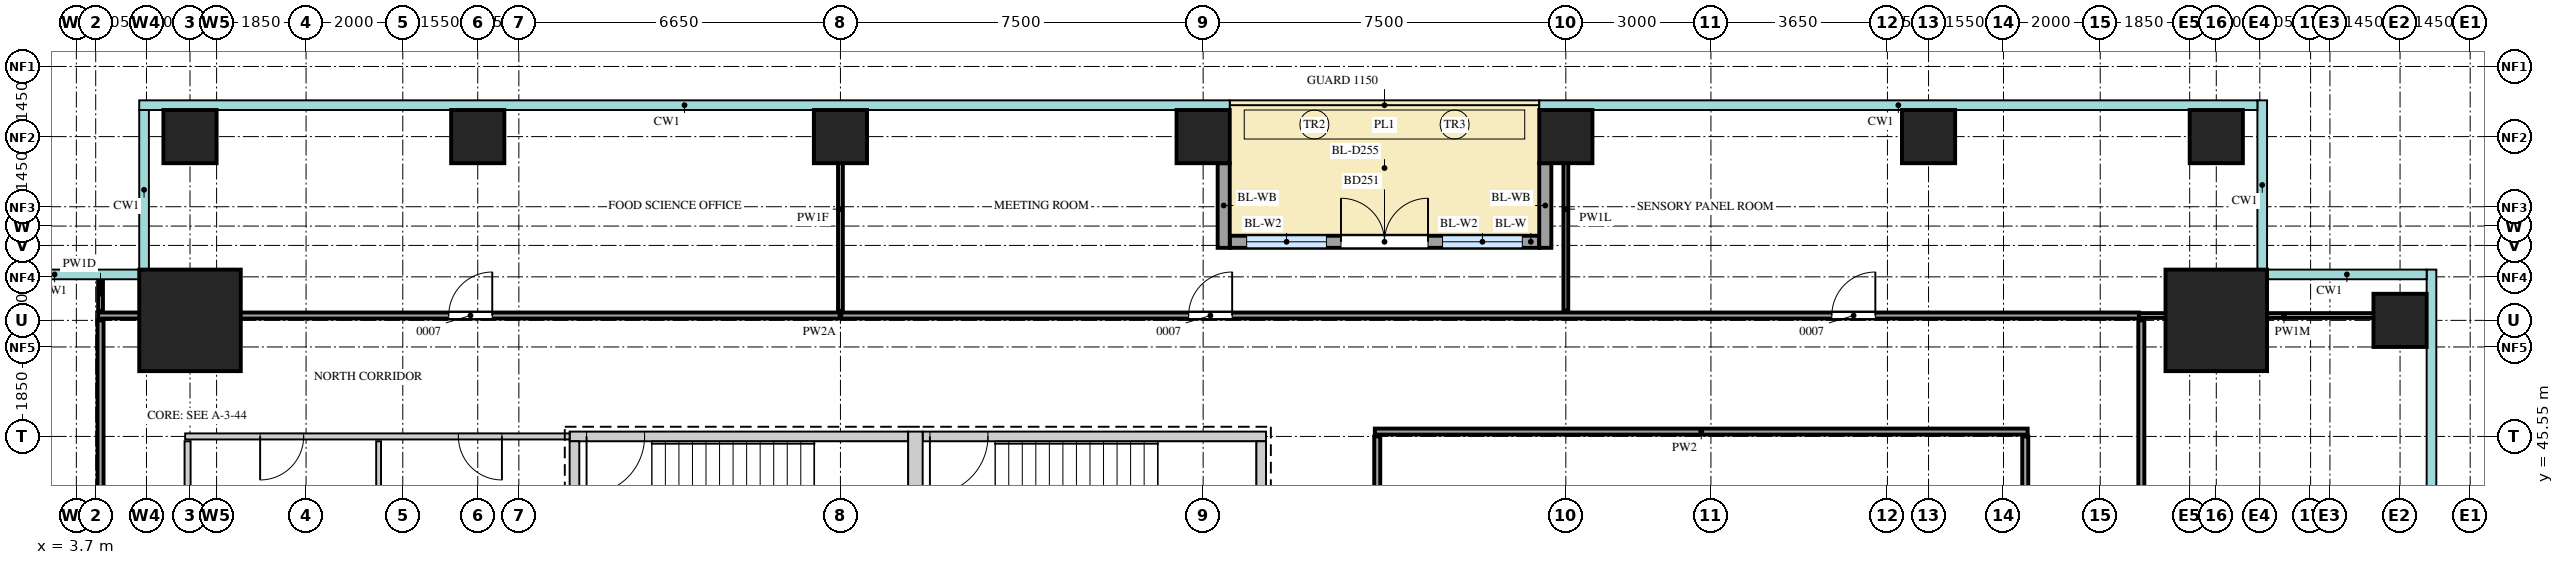
"""IFC4 building model, lengths in metres.
Left out: names, types, materials, properties, quantities, classifications, styles, units other than length and angle.
Written with IfcOpenShell. Run it as: python <this file> out.ifc"""

import sys

from ifc_helpers import new_model, si_unit, direction, frame, frame_2d, origin, origin_2d, place, context, subcontext, project, spatial, rectangle, extrude, source, transform, mapped, element, fill, save


model = new_model("IFC4")
c1 = context("Model", 3, precision=1e-05, world=origin(), true_north=direction((0.0, 1.0)))
c2 = subcontext(c1, "Body", "Model", "MODEL_VIEW")
j1 = project(units=[si_unit("LENGTHUNIT", "METRE"), si_unit("PLANEANGLEUNIT", "RADIAN")], contexts=[c1])
p1 = place(None, origin())
s1 = spatial("IfcSite", under=j1, at=p1, CompositionType="ELEMENT")
p2 = place(p1, origin())
s2 = spatial("IfcBuilding", under=s1, at=p2, CompositionType="ELEMENT")
p3 = place(p2, frame((0.0, 0.0, 119.1)))
s3 = spatial("IfcBuildingStorey", under=s2, at=p3, CompositionType="ELEMENT", Elevation=119.1)
m1 = source(origin(), c2, "Body", "SweptSolid", [
    extrude(rectangle(XDim=7.0, YDim=0.2, at=frame_2d((3.5, 0.0))), origin(), (0.0, 0.0, 1.0), 4.1),
])
p4 = place(p3, frame((13.9, 45.55, 0.0), z_axis=(0.0, 0.0, 1.0), x_axis=(1.0, 0.0, 0.0)))
e1 = element("IfcWall", 1, at=p4, inside=s3, PredefinedType="SHEAR", context=c2, shape_type="MappedRepresentation", body=[
    mapped(m1, transform((0.0, 0.0, 0.0))),
])
m2 = source(origin(), c2, "Body", "SweptSolid", [
    extrude(rectangle(XDim=1.2, YDim=2.1, at=frame_2d((0.6, 1.05))), frame((0.0, 0.11, 0.0), z_axis=(0.0, -1.0, 0.0), x_axis=(1.0, 0.0, 0.0)), (0.0, 0.0, 1.0), 0.22),
])
p5 = place(p4, frame((0.35, 0.0, 0.0)))
e2 = element("IfcOpeningElement", 2, at=p5, cuts=e1, PredefinedType="OPENING", context=c2, shape_type="MappedRepresentation", body=[
    mapped(m2, transform((0.0, 0.0, 0.0))),
])
m3 = source(origin(), c2, "Body", "SweptSolid", [
    extrude(rectangle(XDim=7.1, YDim=0.2, at=frame_2d((3.55, 0.0))), origin(), (0.0, 0.0, 1.0), 4.1),
])
p6 = place(p3, frame((21.2, 45.55, 0.0), z_axis=(0.0, 0.0, 1.0), x_axis=(1.0, 0.0, 0.0)))
e3 = element("IfcWall", 3, at=p6, inside=s3, PredefinedType="SHEAR", context=c2, shape_type="MappedRepresentation", body=[
    mapped(m3, transform((0.0, 0.0, 0.0))),
])
p7 = place(p6, frame((0.15, 0.0, 0.0)))
e4 = element("IfcOpeningElement", 4, at=p7, cuts=e3, PredefinedType="OPENING", context=c2, shape_type="MappedRepresentation", body=[
    mapped(m2, transform((0.0, 0.0, 0.0))),
])
m4 = source(origin(), c2, "Body", "SweptSolid", [
    extrude(rectangle(XDim=3.75, YDim=0.3, at=frame_2d((1.875, 0.0))), origin(), (0.0, 0.0, 1.0), 4.1),
])
p8 = place(p3, frame((21.05, 41.9, 0.0), z_axis=(0.0, 0.0, 1.0), x_axis=(0.0, 1.0, 0.0)))
e5 = element("IfcWall", 5, at=p8, inside=s3, PredefinedType="SHEAR", context=c2, shape_type="MappedRepresentation", body=[
    mapped(m4, transform((0.0, 0.0, 0.0))),
])
m5 = source(origin(), c2, "Body", "SweptSolid", [
    extrude(rectangle(XDim=3.35, YDim=0.2, at=frame_2d((1.675, 0.0))), origin(), (0.0, 0.0, 1.0), 4.1),
])
for number, where, z_axis, x_axis in (
    (6, (14.0, 42.1, 0.0), (0.0, 0.0, 1.0), (0.0, 1.0, 0.0)),
    (7, (28.2, 42.1, 0.0), (0.0, 0.0, 1.0), (0.0, 1.0, 0.0)),
):
    element("IfcWall", number, at=place(p3, frame(where, z_axis=z_axis, x_axis=x_axis)), inside=s3, PredefinedType="SHEAR", context=c2, shape_type="MappedRepresentation", body=[
        mapped(m5, transform((0.0, 0.0, 0.0))),
    ])
m6 = source(origin(), c2, "Body", "SweptSolid", [
    extrude(rectangle(XDim=2.1, YDim=2.1, at=origin_2d()), origin(), (0.0, 0.0, 1.0), 4.4),
])
for number, where, z_axis, x_axis in (
    (8, (47.95, 47.95, 0.0), (0.0, 0.0, 1.0), (1.0, 0.0, 0.0)),
    (9, (6.05, 47.95, 0.0), (0.0, 0.0, 1.0), (1.0, 0.0, 0.0)),
):
    element("IfcColumn", number, at=place(p3, frame(where, z_axis=z_axis, x_axis=x_axis)), inside=s3, PredefinedType="COLUMN", context=c2, shape_type="MappedRepresentation", body=[
        mapped(m6, transform((0.0, 0.0, 0.0))),
    ])
m7 = source(origin(), c2, "Body", "SweptSolid", [
    extrude(rectangle(XDim=1.1, YDim=1.1, at=origin_2d()), origin(), (0.0, 0.0, 1.0), 4.1),
])
for number, where, z_axis, x_axis in (
    (10, (51.75, 47.95, 0.0), (0.0, 0.0, 1.0), (1.0, 0.0, 0.0)),
    (11, (6.05, 51.75, 0.0), (0.0, 0.0, 1.0), (1.0, 0.0, 0.0)),
    (12, (12.0, 51.75, 0.0), (0.0, 0.0, 1.0), (1.0, 0.0, 0.0)),
    (13, (19.5, 51.75, 0.0), (0.0, 0.0, 1.0), (1.0, 0.0, 0.0)),
    (14, (27.0, 51.75, 0.0), (0.0, 0.0, 1.0), (1.0, 0.0, 0.0)),
    (15, (34.5, 51.75, 0.0), (0.0, 0.0, 1.0), (1.0, 0.0, 0.0)),
    (16, (42.0, 51.75, 0.0), (0.0, 0.0, 1.0), (1.0, 0.0, 0.0)),
    (17, (47.95, 51.75, 0.0), (0.0, 0.0, 1.0), (1.0, 0.0, 0.0)),
):
    element("IfcColumn", number, at=place(p3, frame(where, z_axis=z_axis, x_axis=x_axis)), inside=s3, PredefinedType="COLUMN", context=c2, shape_type="MappedRepresentation", body=[
        mapped(m7, transform((0.0, 0.0, 0.0))),
    ])
m8 = source(origin(), c2, "Body", "SweptSolid", [
    extrude(rectangle(XDim=6.4, YDim=0.25, at=frame_2d((3.2, 0.0))), origin(), (0.0, 0.0, 1.0), 4.1),
])
p9 = place(p3, frame((27.55, 49.575, 0.0), z_axis=(0.0, 0.0, 1.0), x_axis=(1.0, 0.0, 0.0)))
e18 = element("IfcWall", 18, at=p9, inside=s3, PredefinedType="SOLIDWALL", context=c2, shape_type="MappedRepresentation", body=[
    mapped(m8, transform((0.0, 0.0, 0.0))),
])
m9 = source(origin(), c2, "Body", "SweptSolid", [
    extrude(rectangle(XDim=1.65, YDim=2.4, at=frame_2d((0.825, 1.2))), frame((0.0, 0.135, 0.0), z_axis=(0.0, -1.0, 0.0), x_axis=(1.0, 0.0, 0.0)), (0.0, 0.0, 1.0), 0.27),
])
p10 = place(p9, frame((0.35, 0.0, 0.0)))
e19 = element("IfcOpeningElement", 19, at=p10, cuts=e18, PredefinedType="OPENING", context=c2, shape_type="MappedRepresentation", body=[
    mapped(m9, transform((0.0, 0.0, 0.0))),
])
p11 = place(p9, frame((4.4, 0.0, 0.0)))
e20 = element("IfcOpeningElement", 20, at=p11, cuts=e18, PredefinedType="OPENING", context=c2, shape_type="MappedRepresentation", body=[
    mapped(m9, transform((0.0, 0.0, 0.0))),
])
m10 = source(origin(), c2, "Body", "SweptSolid", [
    extrude(rectangle(XDim=1.8, YDim=2.4, at=frame_2d((0.9, 1.2))), frame((0.0, 0.135, 0.0), z_axis=(0.0, -1.0, 0.0), x_axis=(1.0, 0.0, 0.0)), (0.0, 0.0, 1.0), 0.27),
])
p12 = place(p9, frame((2.3, 0.0, 0.0)))
e21 = element("IfcOpeningElement", 21, at=p12, cuts=e18, PredefinedType="OPENING", context=c2, shape_type="MappedRepresentation", body=[
    mapped(m10, transform((0.0, 0.0, 0.0))),
])
m11 = source(origin(), c2, "Body", "SweptSolid", [
    extrude(rectangle(XDim=1.75, YDim=0.25, at=frame_2d((0.875, 0.0))), origin(), (0.0, 0.0, 1.0), 3.8),
])
for number, where, z_axis, x_axis in (
    (22, (27.425, 51.2, 0.0), (0.0, 0.0, 1.0), (0.0, -1.0, 0.0)),
    (23, (34.075, 51.2, 0.0), (0.0, 0.0, 1.0), (0.0, -1.0, 0.0)),
):
    element("IfcWall", number, at=place(p3, frame(where, z_axis=z_axis, x_axis=x_axis)), inside=s3, PredefinedType="SOLIDWALL", context=c2, shape_type="MappedRepresentation", body=[
        mapped(m11, transform((0.0, 0.0, 0.0))),
    ])
m12 = source(origin(), c2, "Body", "SweptSolid", [
    extrude(rectangle(XDim=37.65, YDim=0.125, at=frame_2d((18.825, 0.0))), origin(), (0.0, 0.0, 1.0), 4.2),
])
p13 = place(p3, frame((46.4, 10.3, 0.0), z_axis=(0.0, 0.0, 1.0), x_axis=(0.0, 1.0, 0.0)))
e24 = element("IfcWall", 24, at=p13, inside=s3, PredefinedType="PARTITIONING", context=c2, shape_type="MappedRepresentation", body=[
    mapped(m12, transform((0.0, 0.0, 0.0))),
])
m13 = source(origin(), c2, "Body", "SweptSolid", [
    extrude(rectangle(XDim=1.2, YDim=2.1, at=frame_2d((0.6, 1.05))), frame((0.0, 0.073, 0.0), z_axis=(0.0, -1.0, 0.0), x_axis=(1.0, 0.0, 0.0)), (0.0, 0.0, 1.0), 0.145),
])
p14 = place(p13, frame((11.6, 0.0, 0.0)))
e25 = element("IfcOpeningElement", 25, at=p14, cuts=e24, PredefinedType="OPENING", context=c2, shape_type="MappedRepresentation", body=[
    mapped(m13, transform((0.0, 0.0, 0.0))),
])
m14 = source(origin(), c2, "Body", "SweptSolid", [
    extrude(rectangle(XDim=0.9, YDim=2.1, at=frame_2d((0.45, 1.05))), frame((0.0, 0.073, 0.0), z_axis=(0.0, -1.0, 0.0), x_axis=(1.0, 0.0, 0.0)), (0.0, 0.0, 1.0), 0.145),
])
p15 = place(p13, frame((29.45, 0.0, 0.0)))
e26 = element("IfcOpeningElement", 26, at=p15, cuts=e24, PredefinedType="OPENING", context=c2, shape_type="MappedRepresentation", body=[
    mapped(m14, transform((0.0, 0.0, 0.0))),
])
m15 = source(origin(), c2, "Body", "SweptSolid", [
    extrude(rectangle(XDim=32.85, YDim=0.125, at=frame_2d((16.425, 0.0))), origin(), (0.0, 0.0, 1.0), 4.2),
])
p16 = place(p3, frame((44.0, 12.7, 0.0), z_axis=(0.0, 0.0, 1.0), x_axis=(0.0, 1.0, 0.0)))
e27 = element("IfcWall", 27, at=p16, inside=s3, PredefinedType="PARTITIONING", context=c2, shape_type="MappedRepresentation", body=[
    mapped(m15, transform((0.0, 0.0, 0.0))),
])
p17 = place(p16, frame((18.2, 0.0, 0.0)))
e28 = element("IfcOpeningElement", 28, at=p17, cuts=e27, PredefinedType="OPENING", context=c2, shape_type="MappedRepresentation", body=[
    mapped(m13, transform((0.0, 0.0, 0.0))),
])
p18 = place(p16, frame((27.5, 0.0, 0.0)))
e29 = element("IfcOpeningElement", 29, at=p18, cuts=e27, PredefinedType="OPENING", context=c2, shape_type="MappedRepresentation", body=[
    mapped(m13, transform((0.0, 0.0, 0.0))),
])
m16 = source(origin(), c2, "Body", "SweptSolid", [
    extrude(rectangle(XDim=28.75, YDim=0.125, at=frame_2d((14.375, 0.0))), origin(), (0.0, 0.0, 1.0), 4.2),
])
p19 = place(p3, frame((4.2, 19.2, 0.0), z_axis=(0.0, 0.0, 1.0), x_axis=(0.0, 1.0, 0.0)))
e30 = element("IfcWall", 30, at=p19, inside=s3, PredefinedType="PARTITIONING", context=c2, shape_type="MappedRepresentation", body=[
    mapped(m16, transform((0.0, 0.0, 0.0))),
])
p20 = place(p19, frame((3.45, 0.0, 0.0)))
e31 = element("IfcOpeningElement", 31, at=p20, cuts=e30, PredefinedType="OPENING", context=c2, shape_type="MappedRepresentation", body=[
    mapped(m14, transform((0.0, 0.0, 0.0))),
])
p21 = place(p19, frame((16.5, 0.0, 0.0)))
e32 = element("IfcOpeningElement", 32, at=p21, cuts=e30, PredefinedType="OPENING", context=c2, shape_type="MappedRepresentation", body=[
    mapped(m14, transform((0.0, 0.0, 0.0))),
])
m17 = source(origin(), c2, "Body", "SweptSolid", [
    extrude(rectangle(XDim=9.45, YDim=0.125, at=frame_2d((4.725, 0.0))), origin(), (0.0, 0.0, 1.0), 4.2),
])
p22 = place(p3, frame((30.6, 36.1, 0.0), z_axis=(0.0, 0.0, 1.0), x_axis=(0.0, 1.0, 0.0)))
e33 = element("IfcWall", 33, at=p22, inside=s3, PredefinedType="PARTITIONING", context=c2, shape_type="MappedRepresentation", body=[
    mapped(m17, transform((0.0, 0.0, 0.0))),
])
m18 = source(origin(), c2, "Body", "SweptSolid", [
    extrude(rectangle(XDim=3.45, YDim=0.125, at=frame_2d((1.725, 0.0))), origin(), (0.0, 0.0, 1.0), 4.2),
])
p23 = place(p3, frame((6.0, 42.0, 0.0), z_axis=(0.0, 0.0, 1.0), x_axis=(0.0, 1.0, 0.0)))
e34 = element("IfcWall", 34, at=p23, inside=s3, PredefinedType="PARTITIONING", context=c2, shape_type="MappedRepresentation", body=[
    mapped(m18, transform((0.0, 0.0, 0.0))),
])
m19 = source(origin(), c2, "Body", "SweptSolid", [
    extrude(rectangle(XDim=3.45, YDim=0.1, at=frame_2d((1.725, 0.0))), origin(), (0.0, 0.0, 1.0), 4.2),
])
p24 = place(p3, frame((9.95, 42.0, 0.0), z_axis=(0.0, 0.0, 1.0), x_axis=(0.0, 1.0, 0.0)))
e35 = element("IfcWall", 35, at=p24, inside=s3, PredefinedType="PARTITIONING", context=c2, shape_type="MappedRepresentation", body=[
    mapped(m19, transform((0.0, 0.0, 0.0))),
])
m20 = source(origin(), c2, "Body", "SweptSolid", [
    extrude(rectangle(XDim=7.95, YDim=0.125, at=frame_2d((3.975, 0.0))), origin(), (0.0, 0.0, 1.0), 4.2),
])
p25 = place(p3, frame((5.95, 45.55, 0.0), z_axis=(0.0, 0.0, 1.0), x_axis=(1.0, 0.0, 0.0)))
e36 = element("IfcWall", 36, at=p25, inside=s3, PredefinedType="PARTITIONING", context=c2, shape_type="MappedRepresentation", body=[
    mapped(m20, transform((0.0, 0.0, 0.0))),
])
p26 = place(p25, frame((1.55, 0.0, 0.0)))
e37 = element("IfcOpeningElement", 37, at=p26, cuts=e36, PredefinedType="OPENING", context=c2, shape_type="MappedRepresentation", body=[
    mapped(m14, transform((0.0, 0.0, 0.0))),
])
p27 = place(p25, frame((5.65, 0.0, 0.0)))
e38 = element("IfcOpeningElement", 38, at=p27, cuts=e36, PredefinedType="OPENING", context=c2, shape_type="MappedRepresentation", body=[
    mapped(m14, transform((0.0, 0.0, 0.0))),
])
m21 = source(origin(), c2, "Body", "SweptSolid", [
    extrude(rectangle(XDim=13.5, YDim=0.125, at=frame_2d((6.75, 0.0))), origin(), (0.0, 0.0, 1.0), 4.2),
])
p28 = place(p3, frame((30.55, 45.65, 0.0), z_axis=(0.0, 0.0, 1.0), x_axis=(1.0, 0.0, 0.0)))
e39 = element("IfcWall", 39, at=p28, inside=s3, PredefinedType="PARTITIONING", context=c2, shape_type="MappedRepresentation", body=[
    mapped(m21, transform((0.0, 0.0, 0.0))),
])
m22 = source(origin(), c2, "Body", "SweptSolid", [
    extrude(rectangle(XDim=42.2, YDim=0.125, at=frame_2d((21.1, 0.0))), origin(), (0.0, 0.0, 1.0), 3.55),
])
p29 = place(p3, frame((4.15, 48.05, 0.0), z_axis=(0.0, 0.0, 1.0), x_axis=(1.0, 0.0, 0.0)))
e40 = element("IfcWall", 40, at=p29, inside=s3, PredefinedType="PARTITIONING", context=c2, shape_type="MappedRepresentation", body=[
    mapped(m22, transform((0.0, 0.0, 0.0))),
])
p30 = place(p29, frame((7.25, 0.0, 0.0)))
e41 = element("IfcOpeningElement", 41, at=p30, cuts=e40, PredefinedType="OPENING", context=c2, shape_type="MappedRepresentation", body=[
    mapped(m14, transform((0.0, 0.0, 0.0))),
])
p31 = place(p29, frame((22.55, 0.0, 0.0)))
e42 = element("IfcOpeningElement", 42, at=p31, cuts=e40, PredefinedType="OPENING", context=c2, shape_type="MappedRepresentation", body=[
    mapped(m14, transform((0.0, 0.0, 0.0))),
])
p32 = place(p29, frame((35.85, 0.0, 0.0)))
e43 = element("IfcOpeningElement", 43, at=p32, cuts=e40, PredefinedType="OPENING", context=c2, shape_type="MappedRepresentation", body=[
    mapped(m14, transform((0.0, 0.0, 0.0))),
])
m23 = source(origin(), c2, "Body", "SweptSolid", [
    extrude(rectangle(XDim=6.0, YDim=0.1, at=frame_2d((3.0, 0.0))), origin(), (0.0, 0.0, 1.0), 3.55),
])
p33 = place(p3, frame((46.35, 48.05, 0.0), z_axis=(0.0, 0.0, 1.0), x_axis=(1.0, 0.0, 0.0)))
e44 = element("IfcWall", 44, at=p33, inside=s3, PredefinedType="PARTITIONING", context=c2, shape_type="MappedRepresentation", body=[
    mapped(m23, transform((0.0, 0.0, 0.0))),
])
m24 = source(origin(), c2, "Body", "SweptSolid", [
    extrude(rectangle(XDim=0.7, YDim=0.1, at=frame_2d((0.35, 0.0))), origin(), (0.0, 0.0, 1.0), 4.2),
])
p34 = place(p3, frame((4.2, 48.15, 0.0), z_axis=(0.0, 0.0, 1.0), x_axis=(0.0, 1.0, 0.0)))
e45 = element("IfcWall", 45, at=p34, inside=s3, PredefinedType="PARTITIONING", context=c2, shape_type="MappedRepresentation", body=[
    mapped(m24, transform((0.0, 0.0, 0.0))),
])
m25 = source(origin(), c2, "Body", "SweptSolid", [
    extrude(rectangle(XDim=4.2, YDim=0.1, at=frame_2d((2.1, 0.0))), origin(), (0.0, 0.0, 1.0), 3.77),
])
p35 = place(p3, frame((19.5, 48.15, 0.0), z_axis=(0.0, 0.0, 1.0), x_axis=(0.0, 1.0, 0.0)))
e46 = element("IfcWall", 46, at=p35, inside=s3, PredefinedType="PARTITIONING", context=c2, shape_type="MappedRepresentation", body=[
    mapped(m25, transform((0.0, 0.0, 0.0))),
])
m26 = source(origin(), c2, "Body", "SweptSolid", [
    extrude(rectangle(XDim=4.2, YDim=0.1, at=frame_2d((2.1, 0.0))), origin(), (0.0, 0.0, 1.0), 3.6),
])
p36 = place(p3, frame((34.5, 48.15, 0.0), z_axis=(0.0, 0.0, 1.0), x_axis=(0.0, 1.0, 0.0)))
e47 = element("IfcWall", 47, at=p36, inside=s3, PredefinedType="PARTITIONING", context=c2, shape_type="MappedRepresentation", body=[
    mapped(m26, transform((0.0, 0.0, 0.0))),
])
m27 = source(origin(), c2, "Body", "SweptSolid", [
    extrude(rectangle(XDim=1.65, YDim=2.4, at=frame_2d((0.825, 1.2))), frame((0.0, 0.03, 0.0), z_axis=(0.0, -1.0, 0.0), x_axis=(1.0, 0.0, 0.0)), (0.0, 0.0, 1.0), 0.06),
])
p37 = place(p10, origin())
e48 = element("IfcWindow", 48, at=p37, inside=s3, PartitioningType="SINGLE_PANEL", PredefinedType="WINDOW", context=c2, shape_type="MappedRepresentation", body=[
    mapped(m27, transform((0.0, 0.0, 0.0))),
])
fill(e19, e48)
p38 = place(p11, origin())
e49 = element("IfcWindow", 49, at=p38, inside=s3, PartitioningType="SINGLE_PANEL", PredefinedType="WINDOW", context=c2, shape_type="MappedRepresentation", body=[
    mapped(m27, transform((0.0, 0.0, 0.0))),
])
fill(e20, e49)
m28 = source(origin(), c2, "Body", "SweptSolid", [
    extrude(rectangle(XDim=1.8, YDim=2.4, at=frame_2d((0.9, 1.2))), frame((0.0, 0.025, 0.0), z_axis=(0.0, -1.0, 0.0), x_axis=(1.0, 0.0, 0.0)), (0.0, 0.0, 1.0), 0.05),
])
p39 = place(p12, origin())
e50 = element("IfcDoor", 50, at=p39, inside=s3, OperationType="DOUBLE_DOOR_DOUBLE_SWING", PredefinedType="DOOR", context=c2, shape_type="MappedRepresentation", body=[
    mapped(m28, transform((0.0, 0.0, 0.0))),
])
fill(e21, e50)
m29 = source(origin(), c2, "Body", "SweptSolid", [
    extrude(rectangle(XDim=0.9, YDim=2.1, at=frame_2d((0.45, 1.05))), frame((0.0, 0.025, 0.0), z_axis=(0.0, -1.0, 0.0), x_axis=(1.0, 0.0, 0.0)), (0.0, 0.0, 1.0), 0.05),
])
p40 = place(p30, origin())
e51 = element("IfcDoor", 51, at=p40, inside=s3, OperationType="SINGLE_SWING_LEFT", PredefinedType="DOOR", context=c2, shape_type="MappedRepresentation", body=[
    mapped(m29, transform((0.0, 0.0, 0.0))),
])
fill(e41, e51)
p41 = place(p31, origin())
e52 = element("IfcDoor", 52, at=p41, inside=s3, OperationType="SINGLE_SWING_LEFT", PredefinedType="DOOR", context=c2, shape_type="MappedRepresentation", body=[
    mapped(m29, transform((0.0, 0.0, 0.0))),
])
fill(e42, e52)
p42 = place(p32, origin())
e53 = element("IfcDoor", 53, at=p42, inside=s3, OperationType="SINGLE_SWING_LEFT", PredefinedType="DOOR", context=c2, shape_type="MappedRepresentation", body=[
    mapped(m29, transform((0.0, 0.0, 0.0))),
])
fill(e43, e53)
p43 = place(p26, origin())
e54 = element("IfcDoor", 54, at=p43, inside=s3, OperationType="SINGLE_SWING_LEFT", PredefinedType="DOOR", context=c2, shape_type="MappedRepresentation", body=[
    mapped(m29, transform((0.0, 0.0, 0.0))),
])
fill(e37, e54)
p44 = place(p27, origin())
e55 = element("IfcDoor", 55, at=p44, inside=s3, OperationType="SINGLE_SWING_RIGHT", PredefinedType="DOOR", context=c2, shape_type="MappedRepresentation", body=[
    mapped(m29, transform((0.0, 0.0, 0.0))),
])
fill(e38, e55)
m30 = source(origin(), c2, "Body", "SweptSolid", [
    extrude(rectangle(XDim=1.2, YDim=2.1, at=frame_2d((0.6, 1.05))), frame((0.0, 0.025, 0.0), z_axis=(0.0, -1.0, 0.0), x_axis=(1.0, 0.0, 0.0)), (0.0, 0.0, 1.0), 0.05),
])
p45 = place(p5, origin())
e56 = element("IfcDoor", 56, at=p45, inside=s3, OperationType="SINGLE_SWING_LEFT", PredefinedType="DOOR", context=c2, shape_type="MappedRepresentation", body=[
    mapped(m30, transform((0.0, 0.0, 0.0))),
])
fill(e2, e56)
p46 = place(p7, origin())
e57 = element("IfcDoor", 57, at=p46, inside=s3, OperationType="SINGLE_SWING_LEFT", PredefinedType="DOOR", context=c2, shape_type="MappedRepresentation", body=[
    mapped(m30, transform((0.0, 0.0, 0.0))),
])
fill(e4, e57)
save(model, sys.argv[1])
